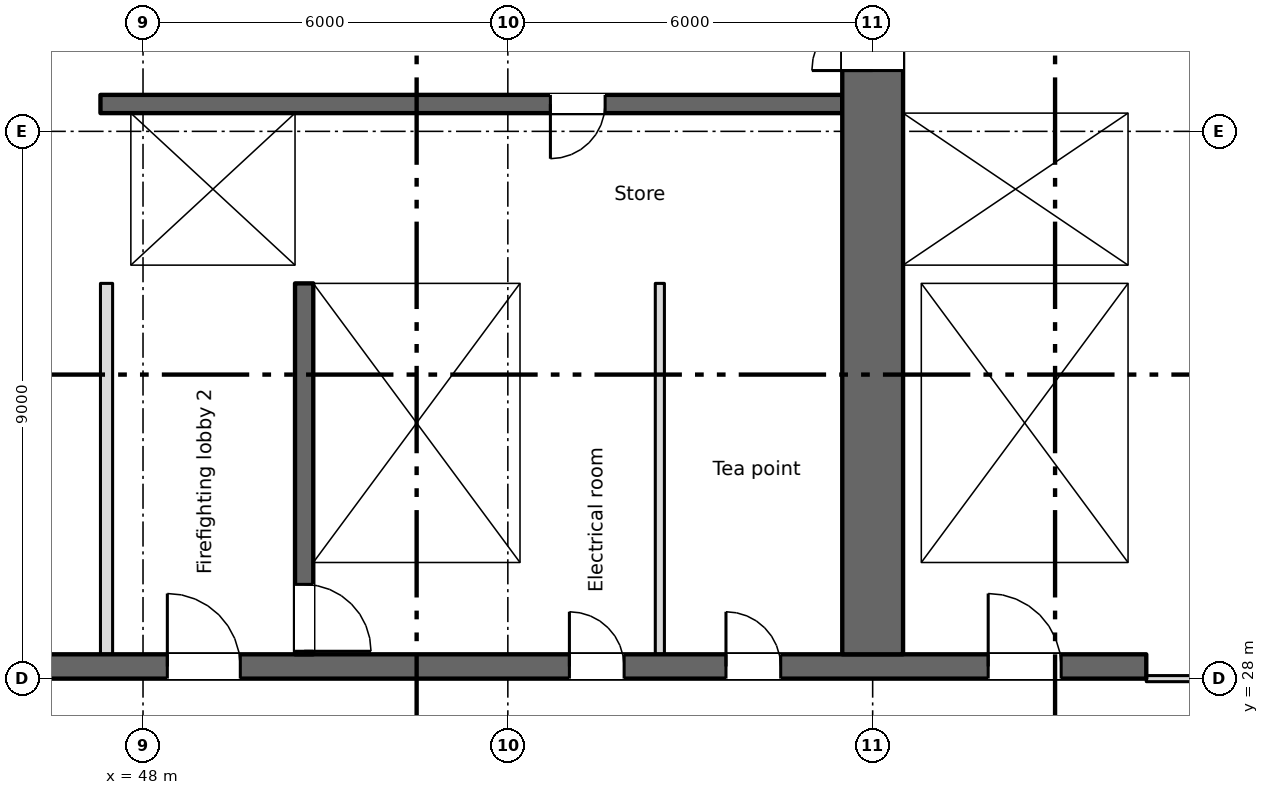
"""IFC4 building model, lengths in metres.
Left out: names, types, materials, properties, quantities, classifications, styles, units other than length and angle.
Written with IfcOpenShell. Run it as: python <this file> out.ifc"""

import sys

from ifc_helpers import new_model, si_unit, direction, frame, frame_2d, origin, place, context, subcontext, project, spatial, rectangle, extrude, element, fill, save


model = new_model("IFC4")
c1 = context("Model", 3, precision=1e-05, world=origin(), true_north=direction((0.0, 1.0)))
c2 = subcontext(c1, "Body", "Model", "MODEL_VIEW")
j1 = project(units=[si_unit("LENGTHUNIT", "METRE"), si_unit("PLANEANGLEUNIT", "RADIAN")], contexts=[c1])
p1 = place(None, origin())
s1 = spatial("IfcSite", under=j1, at=p1, CompositionType="ELEMENT")
p2 = place(p1, origin())
s2 = spatial("IfcBuilding", under=s1, at=p2, CompositionType="ELEMENT")
p3 = place(p2, frame((0.0, 0.0, 45.0)))
s3 = spatial("IfcBuildingStorey", under=s2, at=p3, CompositionType="ELEMENT", Elevation=45.0)
p4 = place(p3, frame((6.7, 28.2, 0.0), z_axis=(0.0, 0.0, 1.0), x_axis=(1.0, 0.0, 0.0)))
e1 = element("IfcWall", 1, at=p4, inside=s3, PredefinedType="SHEAR", context=c2, shape_type="SweptSolid", body=[
    extrude(rectangle(XDim=57.8, YDim=0.4, at=frame_2d((28.9, 0.0))), origin(), (0.0, 0.0, 1.0), 3.35),
])
p5 = place(p4, frame((12.812, 0.0, 0.0)))
e2 = element("IfcOpeningElement", 2, at=p5, cuts=e1, PredefinedType="OPENING", context=c2, shape_type="SweptSolid", body=[
    extrude(rectangle(XDim=0.9, YDim=2.1, at=frame_2d((0.45, 1.05))), frame((0.0, 0.21, 0.0), z_axis=(0.0, -1.0, 0.0), x_axis=(1.0, 0.0, 0.0)), (0.0, 0.0, 1.0), 0.42),
])
p6 = place(p4, frame((15.387, 0.0, 0.0)))
e3 = element("IfcOpeningElement", 3, at=p6, cuts=e1, PredefinedType="OPENING", context=c2, shape_type="SweptSolid", body=[
    extrude(rectangle(XDim=0.9, YDim=2.1, at=frame_2d((0.45, 1.05))), frame((0.0, 0.21, 0.0), z_axis=(0.0, -1.0, 0.0), x_axis=(1.0, 0.0, 0.0)), (0.0, 0.0, 1.0), 0.42),
])
p7 = place(p4, frame((48.312, 0.0, 0.0)))
e4 = element("IfcOpeningElement", 4, at=p7, cuts=e1, PredefinedType="OPENING", context=c2, shape_type="SweptSolid", body=[
    extrude(rectangle(XDim=0.9, YDim=2.1, at=frame_2d((0.45, 1.05))), frame((0.0, 0.21, 0.0), z_axis=(0.0, -1.0, 0.0), x_axis=(1.0, 0.0, 0.0)), (0.0, 0.0, 1.0), 0.42),
])
p8 = place(p4, frame((50.887, 0.0, 0.0)))
e5 = element("IfcOpeningElement", 5, at=p8, cuts=e1, PredefinedType="OPENING", context=c2, shape_type="SweptSolid", body=[
    extrude(rectangle(XDim=0.9, YDim=2.1, at=frame_2d((0.45, 1.05))), frame((0.0, 0.21, 0.0), z_axis=(0.0, -1.0, 0.0), x_axis=(1.0, 0.0, 0.0)), (0.0, 0.0, 1.0), 0.42),
])
p9 = place(p4, frame((0.562, 0.0, 0.0)))
e6 = element("IfcOpeningElement", 6, at=p9, cuts=e1, PredefinedType="OPENING", context=c2, shape_type="SweptSolid", body=[
    extrude(rectangle(XDim=0.9, YDim=2.1, at=frame_2d((0.45, 1.05))), frame((0.0, 0.21, 0.0), z_axis=(0.0, -1.0, 0.0), x_axis=(1.0, 0.0, 0.0)), (0.0, 0.0, 1.0), 0.42),
])
p10 = place(p4, frame((2.137, 0.0, 0.0)))
e7 = element("IfcOpeningElement", 7, at=p10, cuts=e1, PredefinedType="OPENING", context=c2, shape_type="SweptSolid", body=[
    extrude(rectangle(XDim=0.9, YDim=2.1, at=frame_2d((0.45, 1.05))), frame((0.0, 0.21, 0.0), z_axis=(0.0, -1.0, 0.0), x_axis=(1.0, 0.0, 0.0)), (0.0, 0.0, 1.0), 0.42),
])
p11 = place(p4, frame((4.7, 0.0, 0.0)))
e8 = element("IfcOpeningElement", 8, at=p11, cuts=e1, PredefinedType="OPENING", context=c2, shape_type="SweptSolid", body=[
    extrude(rectangle(XDim=1.2, YDim=2.1, at=frame_2d((0.6, 1.05))), frame((0.0, 0.21, 0.0), z_axis=(0.0, -1.0, 0.0), x_axis=(1.0, 0.0, 0.0)), (0.0, 0.0, 1.0), 0.42),
])
p12 = place(p4, frame((31.7, 0.0, 0.0)))
e9 = element("IfcOpeningElement", 9, at=p12, cuts=e1, PredefinedType="OPENING", context=c2, shape_type="SweptSolid", body=[
    extrude(rectangle(XDim=1.2, YDim=2.1, at=frame_2d((0.6, 1.05))), frame((0.0, 0.21, 0.0), z_axis=(0.0, -1.0, 0.0), x_axis=(1.0, 0.0, 0.0)), (0.0, 0.0, 1.0), 0.42),
])
p13 = place(p4, frame((55.2, 0.0, 0.0)))
e10 = element("IfcOpeningElement", 10, at=p13, cuts=e1, PredefinedType="OPENING", context=c2, shape_type="SweptSolid", body=[
    extrude(rectangle(XDim=1.2, YDim=2.1, at=frame_2d((0.6, 1.05))), frame((0.0, 0.21, 0.0), z_axis=(0.0, -1.0, 0.0), x_axis=(1.0, 0.0, 0.0)), (0.0, 0.0, 1.0), 0.42),
])
p14 = place(p4, frame((21.7, 0.0, 0.0)))
e11 = element("IfcOpeningElement", 11, at=p14, cuts=e1, PredefinedType="OPENING", context=c2, shape_type="SweptSolid", body=[
    extrude(rectangle(XDim=1.2, YDim=2.1, at=frame_2d((0.6, 1.05))), frame((0.0, 0.21, 0.0), z_axis=(0.0, -1.0, 0.0), x_axis=(1.0, 0.0, 0.0)), (0.0, 0.0, 1.0), 0.42),
])
p15 = place(p4, frame((41.7, 0.0, 0.0)))
e12 = element("IfcOpeningElement", 12, at=p15, cuts=e1, PredefinedType="OPENING", context=c2, shape_type="SweptSolid", body=[
    extrude(rectangle(XDim=1.2, YDim=2.1, at=frame_2d((0.6, 1.05))), frame((0.0, 0.21, 0.0), z_axis=(0.0, -1.0, 0.0), x_axis=(1.0, 0.0, 0.0)), (0.0, 0.0, 1.0), 0.42),
])
p16 = place(p4, frame((24.85, 0.0, 0.0)))
e13 = element("IfcOpeningElement", 13, at=p16, cuts=e1, PredefinedType="OPENING", context=c2, shape_type="SweptSolid", body=[
    extrude(rectangle(XDim=2.4, YDim=2.1, at=frame_2d((1.2, 1.05))), frame((0.0, 0.21, 0.0), z_axis=(0.0, -1.0, 0.0), x_axis=(1.0, 0.0, 0.0)), (0.0, 0.0, 1.0), 0.42),
])
p17 = place(p4, frame((37.35, 0.0, 0.0)))
e14 = element("IfcOpeningElement", 14, at=p17, cuts=e1, PredefinedType="OPENING", context=c2, shape_type="SweptSolid", body=[
    extrude(rectangle(XDim=2.4, YDim=2.1, at=frame_2d((1.2, 1.05))), frame((0.0, 0.21, 0.0), z_axis=(0.0, -1.0, 0.0), x_axis=(1.0, 0.0, 0.0)), (0.0, 0.0, 1.0), 0.42),
])
p18 = place(p4, frame((7.85, 0.0, 0.0)))
e15 = element("IfcOpeningElement", 15, at=p18, cuts=e1, PredefinedType="OPENING", context=c2, shape_type="SweptSolid", body=[
    extrude(rectangle(XDim=2.4, YDim=2.1, at=frame_2d((1.2, 1.05))), frame((0.0, 0.21, 0.0), z_axis=(0.0, -1.0, 0.0), x_axis=(1.0, 0.0, 0.0)), (0.0, 0.0, 1.0), 0.42),
])
p19 = place(p4, frame((28.85, 0.0, 0.0)))
e16 = element("IfcOpeningElement", 16, at=p19, cuts=e1, PredefinedType="OPENING", context=c2, shape_type="SweptSolid", body=[
    extrude(rectangle(XDim=0.9, YDim=2.1, at=frame_2d((0.45, 1.05))), frame((0.0, 0.21, 0.0), z_axis=(0.0, -1.0, 0.0), x_axis=(1.0, 0.0, 0.0)), (0.0, 0.0, 1.0), 0.42),
])
p20 = place(p4, frame((34.85, 0.0, 0.0)))
e17 = element("IfcOpeningElement", 17, at=p20, cuts=e1, PredefinedType="OPENING", context=c2, shape_type="SweptSolid", body=[
    extrude(rectangle(XDim=0.9, YDim=2.1, at=frame_2d((0.45, 1.05))), frame((0.0, 0.21, 0.0), z_axis=(0.0, -1.0, 0.0), x_axis=(1.0, 0.0, 0.0)), (0.0, 0.0, 1.0), 0.42),
])
p21 = place(p3, frame((64.35, 34.8, 0.0), z_axis=(0.0, 0.0, 1.0), x_axis=(0.0, 1.0, 0.0)))
e18 = element("IfcWall", 18, at=p21, inside=s3, PredefinedType="SHEAR", context=c2, shape_type="SweptSolid", body=[
    extrude(rectangle(XDim=10.2, YDim=0.3, at=frame_2d((5.1, 0.0))), origin(), (0.0, 0.0, 1.0), 3.35),
])
p22 = place(p3, frame((60.0, 28.4, 0.0), z_axis=(0.0, 0.0, 1.0), x_axis=(0.0, 1.0, 0.0)))
e19 = element("IfcWall", 19, at=p22, inside=s3, PredefinedType="SHEAR", context=c2, shape_type="SweptSolid", body=[
    extrude(rectangle(XDim=16.6, YDim=1.0, at=frame_2d((8.3, 0.0))), origin(), (0.0, 0.0, 1.0), 3.35),
])
p23 = place(p22, frame((9.6, 0.0, 0.0)))
e20 = element("IfcOpeningElement", 20, at=p23, cuts=e19, PredefinedType="OPENING", context=c2, shape_type="SweptSolid", body=[
    extrude(rectangle(XDim=2.0, YDim=2.1, at=frame_2d((1.0, 1.05))), frame((0.0, 0.51, 0.0), z_axis=(0.0, -1.0, 0.0), x_axis=(1.0, 0.0, 0.0)), (0.0, 0.0, 1.0), 1.02),
])
p24 = place(p22, frame((15.25, 0.0, 0.0)))
e21 = element("IfcOpeningElement", 21, at=p24, cuts=e19, PredefinedType="OPENING", context=c2, shape_type="SweptSolid", body=[
    extrude(rectangle(XDim=1.2, YDim=2.1, at=frame_2d((0.6, 1.05))), frame((0.0, 0.51, 0.0), z_axis=(0.0, -1.0, 0.0), x_axis=(1.0, 0.0, 0.0)), (0.0, 0.0, 1.0), 1.02),
])
p25 = place(p3, frame((50.65, 34.5, 0.0), z_axis=(0.0, 0.0, 1.0), x_axis=(0.0, -1.0, 0.0)))
e22 = element("IfcWall", 22, at=p25, inside=s3, PredefinedType="SHEAR", context=c2, shape_type="SweptSolid", body=[
    extrude(rectangle(XDim=6.1, YDim=0.3, at=frame_2d((3.05, 0.0))), origin(), (0.0, 0.0, 1.0), 3.35),
])
p26 = place(p25, frame((4.95, 0.0, 0.0)))
e23 = element("IfcOpeningElement", 23, at=p26, cuts=e22, PredefinedType="OPENING", context=c2, shape_type="SweptSolid", body=[
    extrude(rectangle(XDim=1.1, YDim=2.1, at=frame_2d((0.55, 1.05))), frame((0.0, 0.16, 0.0), z_axis=(0.0, -1.0, 0.0), x_axis=(1.0, 0.0, 0.0)), (0.0, 0.0, 1.0), 0.32),
])
for number, where, z_axis, x_axis in (
    (24, (54.35, 28.4, 0.0), (0.0, 0.0, 1.0), (0.0, 1.0, 0.0)),
    (25, (60.65, 28.4, 0.0), (0.0, 0.0, 1.0), (0.0, 1.0, 0.0)),
    (26, (64.35, 28.4, 0.0), (0.0, 0.0, 1.0), (0.0, 1.0, 0.0)),
):
    element("IfcWall", number, at=place(p3, frame(where, z_axis=z_axis, x_axis=x_axis)), inside=s3, PredefinedType="SHEAR", context=c2, shape_type="SweptSolid", body=[
        extrude(rectangle(XDim=6.1, YDim=0.3, at=frame_2d((3.05, 0.0))), origin(), (0.0, 0.0, 1.0), 3.35),
    ])
p27 = place(p3, frame((47.3, 34.65, 0.0), z_axis=(0.0, 0.0, 1.0), x_axis=(1.0, 0.0, 0.0)))
e27 = element("IfcWall", 27, at=p27, inside=s3, PredefinedType="SHEAR", context=c2, shape_type="SweptSolid", body=[
    extrude(rectangle(XDim=12.2, YDim=0.3, at=frame_2d((6.1, 0.0))), origin(), (0.0, 0.0, 1.0), 3.35),
])
p28 = place(p27, frame((1.3, 0.0, 0.0)))
e28 = element("IfcOpeningElement", 28, at=p28, cuts=e27, PredefinedType="OPENING", context=c2, shape_type="SweptSolid", body=[
    extrude(rectangle(XDim=1.1, YDim=2.1, at=frame_2d((0.55, 1.05))), frame((0.0, 0.16, 0.0), z_axis=(0.0, -1.0, 0.0), x_axis=(1.0, 0.0, 0.0)), (0.0, 0.0, 1.0), 0.32),
])
p29 = place(p3, frame((60.5, 34.65, 0.0), z_axis=(0.0, 0.0, 1.0), x_axis=(1.0, 0.0, 0.0)))
e29 = element("IfcWall", 29, at=p29, inside=s3, PredefinedType="SHEAR", context=c2, shape_type="SweptSolid", body=[
    extrude(rectangle(XDim=4.0, YDim=0.3, at=frame_2d((2.0, 0.0))), origin(), (0.0, 0.0, 1.0), 3.35),
])
p30 = place(p3, frame((59.5, 37.45, 0.0), z_axis=(0.0, 0.0, 1.0), x_axis=(-1.0, 0.0, 0.0)))
e30 = element("IfcWall", 30, at=p30, inside=s3, PredefinedType="SHEAR", context=c2, shape_type="SweptSolid", body=[
    extrude(rectangle(XDim=12.2, YDim=0.3, at=frame_2d((6.1, 0.0))), origin(), (0.0, 0.0, 1.0), 3.35),
])
p31 = place(p30, frame((3.9, 0.0, 0.0)))
e31 = element("IfcOpeningElement", 31, at=p31, cuts=e30, PredefinedType="OPENING", context=c2, shape_type="SweptSolid", body=[
    extrude(rectangle(XDim=0.9, YDim=2.1, at=frame_2d((0.45, 1.05))), frame((0.0, 0.16, 0.0), z_axis=(0.0, -1.0, 0.0), x_axis=(1.0, 0.0, 0.0)), (0.0, 0.0, 1.0), 0.32),
])
p32 = place(p3, frame((60.5, 37.45, 0.0), z_axis=(0.0, 0.0, 1.0), x_axis=(1.0, 0.0, 0.0)))
e32 = element("IfcWall", 32, at=p32, inside=s3, PredefinedType="SHEAR", context=c2, shape_type="SweptSolid", body=[
    extrude(rectangle(XDim=3.7, YDim=0.3, at=frame_2d((1.85, 0.0))), origin(), (0.0, 0.0, 1.0), 3.35),
])
p33 = place(p32, frame((1.3, 0.0, 0.0)))
e33 = element("IfcOpeningElement", 33, at=p33, cuts=e32, PredefinedType="OPENING", context=c2, shape_type="SweptSolid", body=[
    extrude(rectangle(XDim=1.1, YDim=2.1, at=frame_2d((0.55, 1.05))), frame((0.0, 0.16, 0.0), z_axis=(0.0, -1.0, 0.0), x_axis=(1.0, 0.0, 0.0)), (0.0, 0.0, 1.0), 0.32),
])
p34 = place(p3, frame((47.55, 34.8, 0.0), z_axis=(0.0, 0.0, 1.0), x_axis=(0.0, 1.0, 0.0)))
e34 = element("IfcWall", 34, at=p34, inside=s3, PredefinedType="SHEAR", context=c2, shape_type="SweptSolid", body=[
    extrude(rectangle(XDim=2.5, YDim=0.5, at=frame_2d((1.25, 0.0))), origin(), (0.0, 0.0, 1.0), 3.35),
])
p35 = place(p3, frame((50.65, 34.8, 0.0), z_axis=(0.0, 0.0, 1.0), x_axis=(0.0, 1.0, 0.0)))
e35 = element("IfcWall", 35, at=p35, inside=s3, PredefinedType="SHEAR", context=c2, shape_type="SweptSolid", body=[
    extrude(rectangle(XDim=2.5, YDim=0.3, at=frame_2d((1.25, 0.0))), origin(), (0.0, 0.0, 1.0), 3.35),
])
p36 = place(p3, frame((47.4, 28.4, 0.0), z_axis=(0.0, 0.0, 1.0), x_axis=(0.0, 1.0, 0.0)))
e36 = element("IfcWall", 36, at=p36, inside=s3, PredefinedType="PARTITIONING", context=c2, shape_type="SweptSolid", body=[
    extrude(rectangle(XDim=6.1, YDim=0.2, at=frame_2d((3.05, 0.0))), origin(), (0.0, 0.0, 1.0), 3.35),
])
p37 = place(p3, frame((56.5, 28.4, 0.0), z_axis=(0.0, 0.0, 1.0), x_axis=(0.0, 1.0, 0.0)))
e37 = element("IfcWall", 37, at=p37, inside=s3, PredefinedType="PARTITIONING", context=c2, shape_type="SweptSolid", body=[
    extrude(rectangle(XDim=6.1, YDim=0.15, at=frame_2d((3.05, 0.0))), origin(), (0.0, 0.0, 1.0), 3.35),
])
p38 = place(p3, frame((64.5, 28.0, 0.0), z_axis=(0.0, 0.0, 1.0), x_axis=(1.0, 0.0, 0.0)))
e38 = element("IfcWall", 38, at=p38, inside=s3, PredefinedType="PARTITIONING", context=c2, shape_type="SweptSolid", body=[
    extrude(rectangle(XDim=12.7, YDim=0.1, at=frame_2d((6.35, 0.0))), origin(), (0.0, 0.0, 1.0), 3.35),
])
p39 = place(p38, frame((8.975, 0.0, 0.0)))
e39 = element("IfcOpeningElement", 39, at=p39, cuts=e38, PredefinedType="OPENING", context=c2, shape_type="SweptSolid", body=[
    extrude(rectangle(XDim=1.8, YDim=2.1, at=frame_2d((0.9, 1.05))), frame((0.0, 0.06, 0.0), z_axis=(0.0, -1.0, 0.0), x_axis=(1.0, 0.0, 0.0)), (0.0, 0.0, 1.0), 0.12),
])
p40 = place(p38, frame((2.625, 0.0, 0.0)))
e40 = element("IfcOpeningElement", 40, at=p40, cuts=e38, PredefinedType="OPENING", context=c2, shape_type="SweptSolid", body=[
    extrude(rectangle(XDim=1.8, YDim=2.1, at=frame_2d((0.9, 1.05))), frame((0.0, 0.06, 0.0), z_axis=(0.0, -1.0, 0.0), x_axis=(1.0, 0.0, 0.0)), (0.0, 0.0, 1.0), 0.12),
])
p41 = place(p7, origin())
e41 = element("IfcDoor", 41, at=p41, inside=s3, OperationType="SINGLE_SWING_LEFT", PredefinedType="DOOR", context=c2, shape_type="SweptSolid", body=[
    extrude(rectangle(XDim=0.9, YDim=2.1, at=frame_2d((0.45, 1.05))), frame((0.0, 0.025, 0.0), z_axis=(0.0, -1.0, 0.0), x_axis=(1.0, 0.0, 0.0)), (0.0, 0.0, 1.0), 0.05),
])
fill(e4, e41)
p42 = place(p8, origin())
e42 = element("IfcDoor", 42, at=p42, inside=s3, OperationType="SINGLE_SWING_LEFT", PredefinedType="DOOR", context=c2, shape_type="SweptSolid", body=[
    extrude(rectangle(XDim=0.9, YDim=2.1, at=frame_2d((0.45, 1.05))), frame((0.0, 0.025, 0.0), z_axis=(0.0, -1.0, 0.0), x_axis=(1.0, 0.0, 0.0)), (0.0, 0.0, 1.0), 0.05),
])
fill(e5, e42)
p43 = place(p31, origin())
e43 = element("IfcDoor", 43, at=p43, inside=s3, OperationType="SINGLE_SWING_RIGHT", PredefinedType="DOOR", context=c2, shape_type="SweptSolid", body=[
    extrude(rectangle(XDim=0.9, YDim=2.1, at=frame_2d((0.45, 1.05))), frame((0.0, 0.025, 0.0), z_axis=(0.0, -1.0, 0.0), x_axis=(1.0, 0.0, 0.0)), (0.0, 0.0, 1.0), 0.05),
])
fill(e31, e43)
p44 = place(p33, origin())
e44 = element("IfcDoor", 44, at=p44, inside=s3, OperationType="SLIDING_TO_LEFT", PredefinedType="DOOR", context=c2, shape_type="SweptSolid", body=[
    extrude(rectangle(XDim=1.1, YDim=2.1, at=frame_2d((0.55, 1.05))), frame((0.0, 0.025, 0.0), z_axis=(0.0, -1.0, 0.0), x_axis=(1.0, 0.0, 0.0)), (0.0, 0.0, 1.0), 0.05),
])
fill(e33, e44)
p45 = place(p28, origin())
e45 = element("IfcDoor", 45, at=p45, inside=s3, OperationType="SLIDING_TO_LEFT", PredefinedType="DOOR", context=c2, shape_type="SweptSolid", body=[
    extrude(rectangle(XDim=1.1, YDim=2.1, at=frame_2d((0.55, 1.05))), frame((0.0, 0.025, 0.0), z_axis=(0.0, -1.0, 0.0), x_axis=(1.0, 0.0, 0.0)), (0.0, 0.0, 1.0), 0.05),
])
fill(e28, e45)
p46 = place(p26, origin())
e46 = element("IfcDoor", 46, at=p46, inside=s3, OperationType="SINGLE_SWING_RIGHT", PredefinedType="DOOR", context=c2, shape_type="SweptSolid", body=[
    extrude(rectangle(XDim=1.1, YDim=2.1, at=frame_2d((0.55, 1.05))), frame((0.0, 0.025, 0.0), z_axis=(0.0, -1.0, 0.0), x_axis=(1.0, 0.0, 0.0)), (0.0, 0.0, 1.0), 0.05),
])
fill(e23, e46)
p47 = place(p13, origin())
e47 = element("IfcDoor", 47, at=p47, inside=s3, OperationType="SINGLE_SWING_LEFT", PredefinedType="DOOR", context=c2, shape_type="SweptSolid", body=[
    extrude(rectangle(XDim=1.2, YDim=2.1, at=frame_2d((0.6, 1.05))), frame((0.0, 0.025, 0.0), z_axis=(0.0, -1.0, 0.0), x_axis=(1.0, 0.0, 0.0)), (0.0, 0.0, 1.0), 0.05),
])
fill(e10, e47)
p48 = place(p15, origin())
e48 = element("IfcDoor", 48, at=p48, inside=s3, OperationType="SINGLE_SWING_LEFT", PredefinedType="DOOR", context=c2, shape_type="SweptSolid", body=[
    extrude(rectangle(XDim=1.2, YDim=2.1, at=frame_2d((0.6, 1.05))), frame((0.0, 0.025, 0.0), z_axis=(0.0, -1.0, 0.0), x_axis=(1.0, 0.0, 0.0)), (0.0, 0.0, 1.0), 0.05),
])
fill(e12, e48)
p49 = place(p23, origin())
e49 = element("IfcDoor", 49, at=p49, inside=s3, OperationType="DOUBLE_DOOR_SINGLE_SWING", PredefinedType="DOOR", context=c2, shape_type="SweptSolid", body=[
    extrude(rectangle(XDim=2.0, YDim=2.1, at=frame_2d((1.0, 1.05))), frame((0.0, 0.025, 0.0), z_axis=(0.0, -1.0, 0.0), x_axis=(1.0, 0.0, 0.0)), (0.0, 0.0, 1.0), 0.05),
])
fill(e20, e49)
save(model, sys.argv[1])
